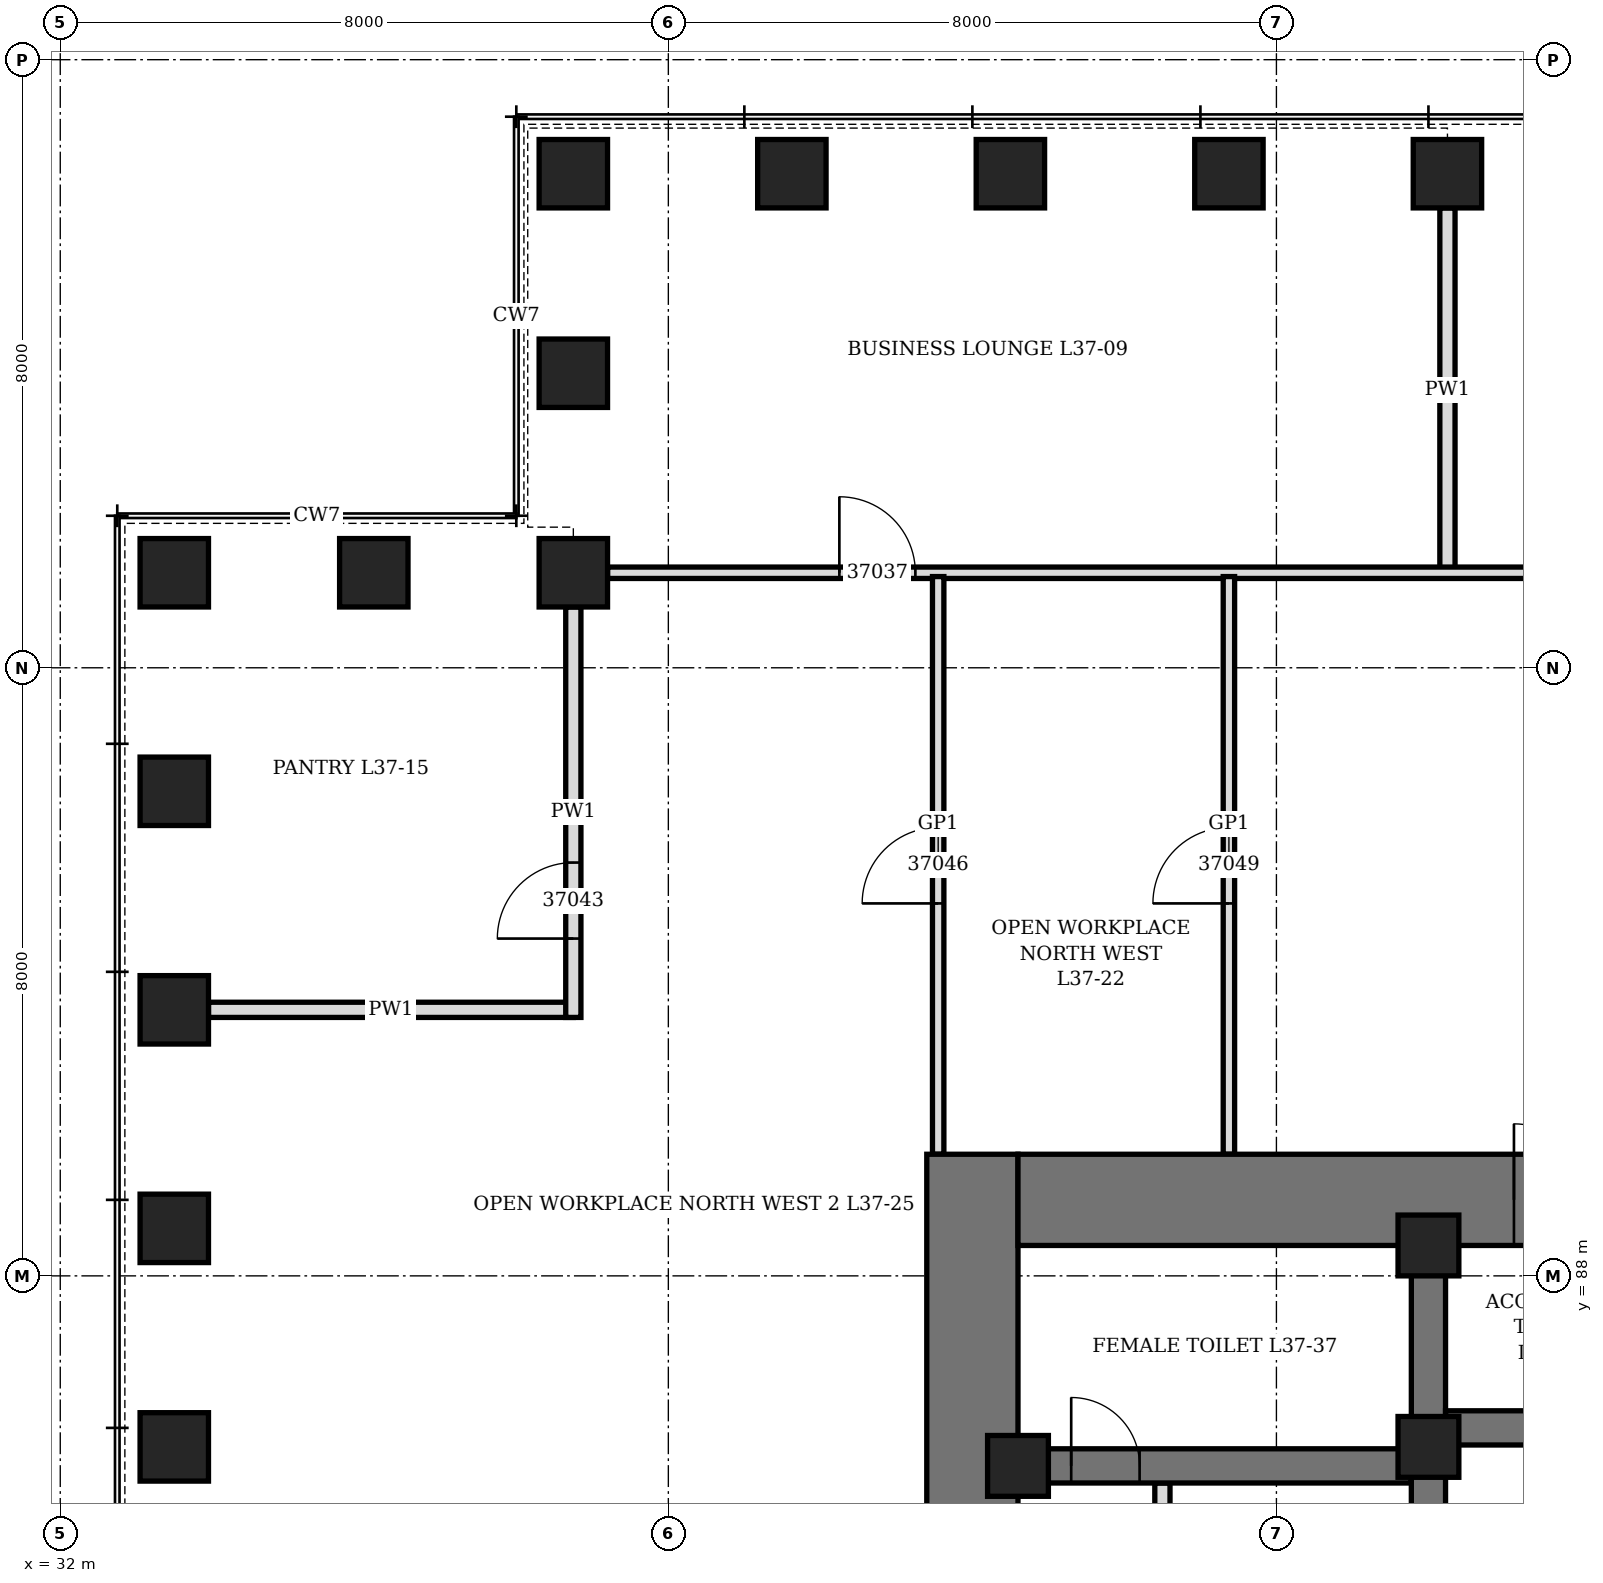
"""IFC4 building model, lengths in metres.
Left out: names, types, materials, properties, quantities, classifications, styles, units other than length and angle.
Written with IfcOpenShell. Run it as: python <this file> out.ifc"""

import sys

from ifc_helpers import new_model, si_unit, direction, frame, frame_2d, origin, origin_2d, place, context, subcontext, project, spatial, rectangle, hollow_rectangle, extrude, element, fill, save


model = new_model("IFC4")
c1 = context("Model", 3, precision=1e-05, world=origin(), true_north=direction((0.0, 1.0)))
c2 = subcontext(c1, "Body", "Model", "MODEL_VIEW")
j1 = project(units=[si_unit("LENGTHUNIT", "METRE"), si_unit("PLANEANGLEUNIT", "RADIAN")], contexts=[c1])
p1 = place(None, origin())
s1 = spatial("IfcSite", under=j1, at=p1, CompositionType="ELEMENT")
p2 = place(p1, origin())
s2 = spatial("IfcBuilding", under=s1, at=p2, CompositionType="ELEMENT")
p3 = place(p2, frame((0.0, 0.0, 166.9)))
s3 = spatial("IfcBuildingStorey", under=s2, at=p3, CompositionType="ELEMENT", Elevation=166.9)
for number, where, z_axis, x_axis in (
    (1, (50.25, 102.5, 0.0), (0.0, 0.0, 1.0), (1.0, 0.0, 0.0)),
    (2, (47.375, 102.5, 0.0), (0.0, 0.0, 1.0), (1.0, 0.0, 0.0)),
    (3, (44.5, 102.5, 0.0), (0.0, 0.0, 1.0), (1.0, 0.0, 0.0)),
    (4, (41.625, 102.5, 0.0), (0.0, 0.0, 1.0), (1.0, 0.0, 0.0)),
    (5, (38.75, 102.5, 0.0), (0.0, 0.0, 1.0), (0.0, 1.0, 0.0)),
    (6, (38.75, 99.875, 0.0), (0.0, 0.0, 1.0), (0.0, 1.0, 0.0)),
    (7, (38.75, 97.25, 0.0), (0.0, 0.0, 1.0), (1.0, 0.0, 0.0)),
    (8, (36.125, 97.25, 0.0), (0.0, 0.0, 1.0), (1.0, 0.0, 0.0)),
    (9, (33.5, 97.25, 0.0), (0.0, 0.0, 1.0), (0.0, 1.0, 0.0)),
    (10, (33.5, 94.375, 0.0), (0.0, 0.0, 1.0), (0.0, 1.0, 0.0)),
    (11, (33.5, 91.5, 0.0), (0.0, 0.0, 1.0), (0.0, 1.0, 0.0)),
    (12, (33.5, 88.625, 0.0), (0.0, 0.0, 1.0), (0.0, 1.0, 0.0)),
    (13, (33.5, 85.75, 0.0), (0.0, 0.0, 1.0), (0.0, 1.0, 0.0)),
):
    element("IfcColumn", number, at=place(p3, frame(where, z_axis=z_axis, x_axis=x_axis)), inside=s3, PredefinedType="COLUMN", context=c2, shape_type="SweptSolid", body=[
        extrude(hollow_rectangle(XDim=0.9, YDim=0.9, WallThickness=0.12, at=origin_2d()), origin(), (0.0, 0.0, 1.0), 4.2),
    ])
p4 = place(p3, frame((44.0, 70.4, 0.0), z_axis=(0.0, 0.0, 1.0), x_axis=(0.0, 1.0, 0.0)))
e14 = element("IfcWall", 14, at=p4, inside=s3, PredefinedType="SHEAR", context=c2, shape_type="SweptSolid", body=[
    extrude(rectangle(XDim=19.2, YDim=1.2, at=frame_2d((9.6, 0.0))), origin(), (0.0, 0.0, 1.0), 4.2),
])
p5 = place(p4, frame((8.6, 0.0, 0.0)))
e15 = element("IfcOpeningElement", 15, at=p5, cuts=e14, PredefinedType="OPENING", context=c2, shape_type="SweptSolid", body=[
    extrude(rectangle(XDim=2.0, YDim=2.4, at=frame_2d((1.0, 1.2))), frame((0.0, 0.61, 0.0), z_axis=(0.0, -1.0, 0.0), x_axis=(1.0, 0.0, 0.0)), (0.0, 0.0, 1.0), 1.22),
])
p6 = place(p3, frame((44.6, 89.0, 0.0), z_axis=(0.0, 0.0, 1.0), x_axis=(1.0, 0.0, 0.0)))
e16 = element("IfcWall", 16, at=p6, inside=s3, PredefinedType="SHEAR", context=c2, shape_type="SweptSolid", body=[
    extrude(rectangle(XDim=22.8, YDim=1.2, at=frame_2d((11.4, 0.0))), origin(), (0.0, 0.0, 1.0), 4.2),
])
p7 = place(p6, frame((6.525, 0.0, 0.0)))
e17 = element("IfcOpeningElement", 17, at=p7, cuts=e16, PredefinedType="OPENING", context=c2, shape_type="SweptSolid", body=[
    extrude(rectangle(XDim=1.0, YDim=2.1, at=frame_2d((0.5, 1.05))), frame((0.0, 0.61, 0.0), z_axis=(0.0, -1.0, 0.0), x_axis=(1.0, 0.0, 0.0)), (0.0, 0.0, 1.0), 1.22),
])
p8 = place(p6, frame((9.45, 0.0, 0.0)))
e18 = element("IfcOpeningElement", 18, at=p8, cuts=e16, PredefinedType="OPENING", context=c2, shape_type="SweptSolid", body=[
    extrude(rectangle(XDim=0.9, YDim=2.1, at=frame_2d((0.45, 1.05))), frame((0.0, 0.61, 0.0), z_axis=(0.0, -1.0, 0.0), x_axis=(1.0, 0.0, 0.0)), (0.0, 0.0, 1.0), 1.22),
])
p9 = place(p6, frame((12.025, 0.0, 0.0)))
e19 = element("IfcOpeningElement", 19, at=p9, cuts=e16, PredefinedType="OPENING", context=c2, shape_type="SweptSolid", body=[
    extrude(rectangle(XDim=0.9, YDim=2.1, at=frame_2d((0.45, 1.05))), frame((0.0, 0.61, 0.0), z_axis=(0.0, -1.0, 0.0), x_axis=(1.0, 0.0, 0.0)), (0.0, 0.0, 1.0), 1.22),
])
p10 = place(p6, frame((13.962, 0.0, 0.0)))
e20 = element("IfcOpeningElement", 20, at=p10, cuts=e16, PredefinedType="OPENING", context=c2, shape_type="SweptSolid", body=[
    extrude(rectangle(XDim=0.9, YDim=2.1, at=frame_2d((0.45, 1.05))), frame((0.0, 0.61, 0.0), z_axis=(0.0, -1.0, 0.0), x_axis=(1.0, 0.0, 0.0)), (0.0, 0.0, 1.0), 1.22),
])
p11 = place(p3, frame((50.0, 71.6, 0.0), z_axis=(0.0, 0.0, 1.0), x_axis=(0.0, 1.0, 0.0)))
e21 = element("IfcWall", 21, at=p11, inside=s3, PredefinedType="SHEAR", context=c2, shape_type="SweptSolid", body=[
    extrude(rectangle(XDim=16.8, YDim=0.45, at=frame_2d((8.4, 0.0))), origin(), (0.0, 0.0, 1.0), 4.2),
])
p12 = place(p11, frame((7.5, 0.0, 0.0)))
e22 = element("IfcOpeningElement", 22, at=p12, cuts=e21, PredefinedType="OPENING", context=c2, shape_type="SweptSolid", body=[
    extrude(rectangle(XDim=1.8, YDim=2.4, at=frame_2d((0.9, 1.2))), frame((0.0, 0.235, 0.0), z_axis=(0.0, -1.0, 0.0), x_axis=(1.0, 0.0, 0.0)), (0.0, 0.0, 1.0), 0.47),
])
p13 = place(p3, frame((44.6, 85.5, 0.0), z_axis=(0.0, 0.0, 1.0), x_axis=(1.0, 0.0, 0.0)))
e23 = element("IfcWall", 23, at=p13, inside=s3, PredefinedType="SHEAR", context=c2, shape_type="SweptSolid", body=[
    extrude(rectangle(XDim=5.175, YDim=0.45, at=frame_2d((2.587, 0.0))), origin(), (0.0, 0.0, 1.0), 4.2),
])
p14 = place(p13, frame((0.7, 0.0, 0.0)))
e24 = element("IfcOpeningElement", 24, at=p14, cuts=e23, PredefinedType="OPENING", context=c2, shape_type="SweptSolid", body=[
    extrude(rectangle(XDim=0.9, YDim=2.1, at=frame_2d((0.45, 1.05))), frame((0.0, 0.235, 0.0), z_axis=(0.0, -1.0, 0.0), x_axis=(1.0, 0.0, 0.0)), (0.0, 0.0, 1.0), 0.47),
])
p15 = place(p3, frame((50.225, 86.0, 0.0), z_axis=(0.0, 0.0, 1.0), x_axis=(1.0, 0.0, 0.0)))
e25 = element("IfcWall", 25, at=p15, inside=s3, PredefinedType="SHEAR", context=c2, shape_type="SweptSolid", body=[
    extrude(rectangle(XDim=11.55, YDim=0.45, at=frame_2d((5.775, 0.0))), origin(), (0.0, 0.0, 1.0), 4.2),
])
for number, where, z_axis, x_axis in (
    (26, (44.6, 85.5, 0.0), (0.0, 0.0, 1.0), (1.0, 0.0, 0.0)),
    (27, (50.0, 85.75, 0.0), (0.0, 0.0, 1.0), (1.0, 0.0, 0.0)),
    (28, (50.0, 88.4, 0.0), (0.0, 0.0, 1.0), (1.0, 0.0, 0.0)),
):
    element("IfcColumn", number, at=place(p3, frame(where, z_axis=z_axis, x_axis=x_axis)), inside=s3, PredefinedType="COLUMN", context=c2, shape_type="SweptSolid", body=[
        extrude(hollow_rectangle(XDim=0.8, YDim=0.8, WallThickness=0.1, at=origin_2d()), origin(), (0.0, 0.0, 1.0), 4.2),
    ])
p16 = place(p3, frame((46.5, 82.225, 0.0), z_axis=(0.0, 0.0, 1.0), x_axis=(0.0, 1.0, 0.0)))
e29 = element("IfcWall", 29, at=p16, inside=s3, PredefinedType="PARTITIONING", context=c2, shape_type="SweptSolid", body=[
    extrude(rectangle(XDim=3.05, YDim=0.2, at=frame_2d((1.525, 0.0))), origin(), (0.0, 0.0, 1.0), 4.04),
])
p17 = place(p16, frame((1.075, 0.0, 0.0)))
e30 = element("IfcOpeningElement", 30, at=p17, cuts=e29, PredefinedType="OPENING", context=c2, shape_type="SweptSolid", body=[
    extrude(rectangle(XDim=0.9, YDim=2.1, at=frame_2d((0.45, 1.05))), frame((0.0, 0.11, 0.0), z_axis=(0.0, -1.0, 0.0), x_axis=(1.0, 0.0, 0.0)), (0.0, 0.0, 1.0), 0.22),
])
p18 = place(p3, frame((50.25, 97.25, 0.0), z_axis=(0.0, 0.0, 1.0), x_axis=(0.0, 1.0, 0.0)))
e31 = element("IfcWall", 31, at=p18, inside=s3, PredefinedType="PARTITIONING", context=c2, shape_type="SweptSolid", body=[
    extrude(rectangle(XDim=4.8, YDim=0.2, at=frame_2d((2.4, 0.0))), origin(), (0.0, 0.0, 1.0), 3.278),
])
p19 = place(p3, frame((33.95, 91.5, 0.0), z_axis=(0.0, 0.0, 1.0), x_axis=(1.0, 0.0, 0.0)))
e32 = element("IfcWall", 32, at=p19, inside=s3, PredefinedType="PARTITIONING", context=c2, shape_type="SweptSolid", body=[
    extrude(rectangle(XDim=4.8, YDim=0.2, at=frame_2d((2.4, 0.0))), origin(), (0.0, 0.0, 1.0), 3.428),
])
p20 = place(p3, frame((39.2, 97.25, 0.0), z_axis=(0.0, 0.0, 1.0), x_axis=(1.0, 0.0, 0.0)))
e33 = element("IfcWall", 33, at=p20, inside=s3, PredefinedType="PARTITIONING", context=c2, shape_type="SweptSolid", body=[
    extrude(rectangle(XDim=33.6, YDim=0.15, at=frame_2d((16.8, 0.0))), origin(), (0.0, 0.0, 1.0), 4.04),
])
p21 = place(p20, frame((3.05, 0.0, 0.0)))
e34 = element("IfcOpeningElement", 34, at=p21, cuts=e33, PredefinedType="OPENING", context=c2, shape_type="SweptSolid", body=[
    extrude(rectangle(XDim=1.0, YDim=2.4, at=frame_2d((0.5, 1.2))), frame((0.0, 0.085, 0.0), z_axis=(0.0, -1.0, 0.0), x_axis=(1.0, 0.0, 0.0)), (0.0, 0.0, 1.0), 0.17),
])
p22 = place(p20, frame((14.863, 0.0, 0.0)))
e35 = element("IfcOpeningElement", 35, at=p22, cuts=e33, PredefinedType="OPENING", context=c2, shape_type="SweptSolid", body=[
    extrude(rectangle(XDim=1.0, YDim=2.4, at=frame_2d((0.5, 1.2))), frame((0.0, 0.085, 0.0), z_axis=(0.0, -1.0, 0.0), x_axis=(1.0, 0.0, 0.0)), (0.0, 0.0, 1.0), 0.17),
])
p23 = place(p20, frame((23.488, 0.0, 0.0)))
e36 = element("IfcOpeningElement", 36, at=p23, cuts=e33, PredefinedType="OPENING", context=c2, shape_type="SweptSolid", body=[
    extrude(rectangle(XDim=1.0, YDim=2.1, at=frame_2d((0.5, 1.05))), frame((0.0, 0.085, 0.0), z_axis=(0.0, -1.0, 0.0), x_axis=(1.0, 0.0, 0.0)), (0.0, 0.0, 1.0), 0.17),
])
p24 = place(p20, frame((29.55, 0.0, 0.0)))
e37 = element("IfcOpeningElement", 37, at=p24, cuts=e33, PredefinedType="OPENING", context=c2, shape_type="SweptSolid", body=[
    extrude(rectangle(XDim=1.0, YDim=2.1, at=frame_2d((0.5, 1.05))), frame((0.0, 0.085, 0.0), z_axis=(0.0, -1.0, 0.0), x_axis=(1.0, 0.0, 0.0)), (0.0, 0.0, 1.0), 0.17),
])
p25 = place(p3, frame((38.75, 91.4, 0.0), z_axis=(0.0, 0.0, 1.0), x_axis=(0.0, 1.0, 0.0)))
e38 = element("IfcWall", 38, at=p25, inside=s3, PredefinedType="PARTITIONING", context=c2, shape_type="SweptSolid", body=[
    extrude(rectangle(XDim=5.4, YDim=0.2, at=frame_2d((2.7, 0.0))), origin(), (0.0, 0.0, 1.0), 4.04),
])
p26 = place(p25, frame((1.038, 0.0, 0.0)))
e39 = element("IfcOpeningElement", 39, at=p26, cuts=e38, PredefinedType="OPENING", context=c2, shape_type="SweptSolid", body=[
    extrude(rectangle(XDim=1.0, YDim=2.1, at=frame_2d((0.5, 1.05))), frame((0.0, 0.11, 0.0), z_axis=(0.0, -1.0, 0.0), x_axis=(1.0, 0.0, 0.0)), (0.0, 0.0, 1.0), 0.22),
])
p27 = place(p3, frame((43.55, 89.6, 0.0), z_axis=(0.0, 0.0, 1.0), x_axis=(0.0, 1.0, 0.0)))
e40 = element("IfcWall", 40, at=p27, inside=s3, PredefinedType="PARTITIONING", context=c2, shape_type="SweptSolid", body=[
    extrude(rectangle(XDim=7.6, YDim=0.15, at=frame_2d((3.8, 0.0))), origin(), (0.0, 0.0, 1.0), 4.04),
])
p28 = place(p27, frame((3.3, 0.0, 0.0)))
e41 = element("IfcOpeningElement", 41, at=p28, cuts=e40, PredefinedType="OPENING", context=c2, shape_type="SweptSolid", body=[
    extrude(rectangle(XDim=1.0, YDim=2.4, at=frame_2d((0.5, 1.2))), frame((0.0, 0.085, 0.0), z_axis=(0.0, -1.0, 0.0), x_axis=(1.0, 0.0, 0.0)), (0.0, 0.0, 1.0), 0.17),
])
p29 = place(p3, frame((47.375, 89.6, 0.0), z_axis=(0.0, 0.0, 1.0), x_axis=(0.0, 1.0, 0.0)))
e42 = element("IfcWall", 42, at=p29, inside=s3, PredefinedType="PARTITIONING", context=c2, shape_type="SweptSolid", body=[
    extrude(rectangle(XDim=7.6, YDim=0.15, at=frame_2d((3.8, 0.0))), origin(), (0.0, 0.0, 1.0), 3.278),
])
p30 = place(p29, frame((3.3, 0.0, 0.0)))
e43 = element("IfcOpeningElement", 43, at=p30, cuts=e42, PredefinedType="OPENING", context=c2, shape_type="SweptSolid", body=[
    extrude(rectangle(XDim=1.0, YDim=2.4, at=frame_2d((0.5, 1.2))), frame((0.0, 0.085, 0.0), z_axis=(0.0, -1.0, 0.0), x_axis=(1.0, 0.0, 0.0)), (0.0, 0.0, 1.0), 0.17),
])
p31 = place(p14, origin())
e44 = element("IfcDoor", 44, at=p31, inside=s3, OperationType="SINGLE_SWING_RIGHT", PredefinedType="DOOR", context=c2, shape_type="SweptSolid", body=[
    extrude(rectangle(XDim=0.9, YDim=2.1, at=frame_2d((0.45, 1.05))), frame((0.0, 0.225, 0.0), z_axis=(0.0, -1.0, 0.0), x_axis=(1.0, 0.0, 0.0)), (0.0, 0.0, 1.0), 0.449),
])
fill(e24, e44)
p32 = place(p7, origin())
e45 = element("IfcDoor", 45, at=p32, inside=s3, OperationType="SINGLE_SWING_LEFT", PredefinedType="DOOR", context=c2, shape_type="SweptSolid", body=[
    extrude(rectangle(XDim=1.0, YDim=2.1, at=frame_2d((0.5, 1.05))), frame((0.0, 0.35, 0.0), z_axis=(0.0, -1.0, 0.0), x_axis=(1.0, 0.0, 0.0)), (0.0, 0.0, 1.0), 0.7),
])
fill(e17, e45)
p33 = place(p21, origin())
e46 = element("IfcDoor", 46, at=p33, inside=s3, OperationType="SINGLE_SWING_RIGHT", PredefinedType="DOOR", context=c2, shape_type="SweptSolid", body=[
    extrude(rectangle(XDim=1.0, YDim=2.4, at=frame_2d((0.5, 1.2))), frame((0.0, 0.075, 0.0), z_axis=(0.0, -1.0, 0.0), x_axis=(1.0, 0.0, 0.0)), (0.0, 0.0, 1.0), 0.149),
])
fill(e34, e46)
p34 = place(p26, origin())
e47 = element("IfcDoor", 47, at=p34, inside=s3, OperationType="SINGLE_SWING_LEFT", PredefinedType="DOOR", context=c2, shape_type="SweptSolid", body=[
    extrude(rectangle(XDim=1.0, YDim=2.1, at=frame_2d((0.5, 1.05))), frame((0.0, 0.1, 0.0), z_axis=(0.0, -1.0, 0.0), x_axis=(1.0, 0.0, 0.0)), (0.0, 0.0, 1.0), 0.199),
])
fill(e39, e47)
p35 = place(p28, origin())
e48 = element("IfcDoor", 48, at=p35, inside=s3, OperationType="SINGLE_SWING_RIGHT", PredefinedType="DOOR", context=c2, shape_type="SweptSolid", body=[
    extrude(rectangle(XDim=1.0, YDim=2.4, at=frame_2d((0.5, 1.2))), frame((0.0, 0.075, 0.0), z_axis=(0.0, -1.0, 0.0), x_axis=(1.0, 0.0, 0.0)), (0.0, 0.0, 1.0), 0.149),
])
fill(e41, e48)
p36 = place(p30, origin())
e49 = element("IfcDoor", 49, at=p36, inside=s3, OperationType="SINGLE_SWING_RIGHT", PredefinedType="DOOR", context=c2, shape_type="SweptSolid", body=[
    extrude(rectangle(XDim=1.0, YDim=2.4, at=frame_2d((0.5, 1.2))), frame((0.0, 0.075, 0.0), z_axis=(0.0, -1.0, 0.0), x_axis=(1.0, 0.0, 0.0)), (0.0, 0.0, 1.0), 0.149),
])
fill(e43, e49)
save(model, sys.argv[1])
